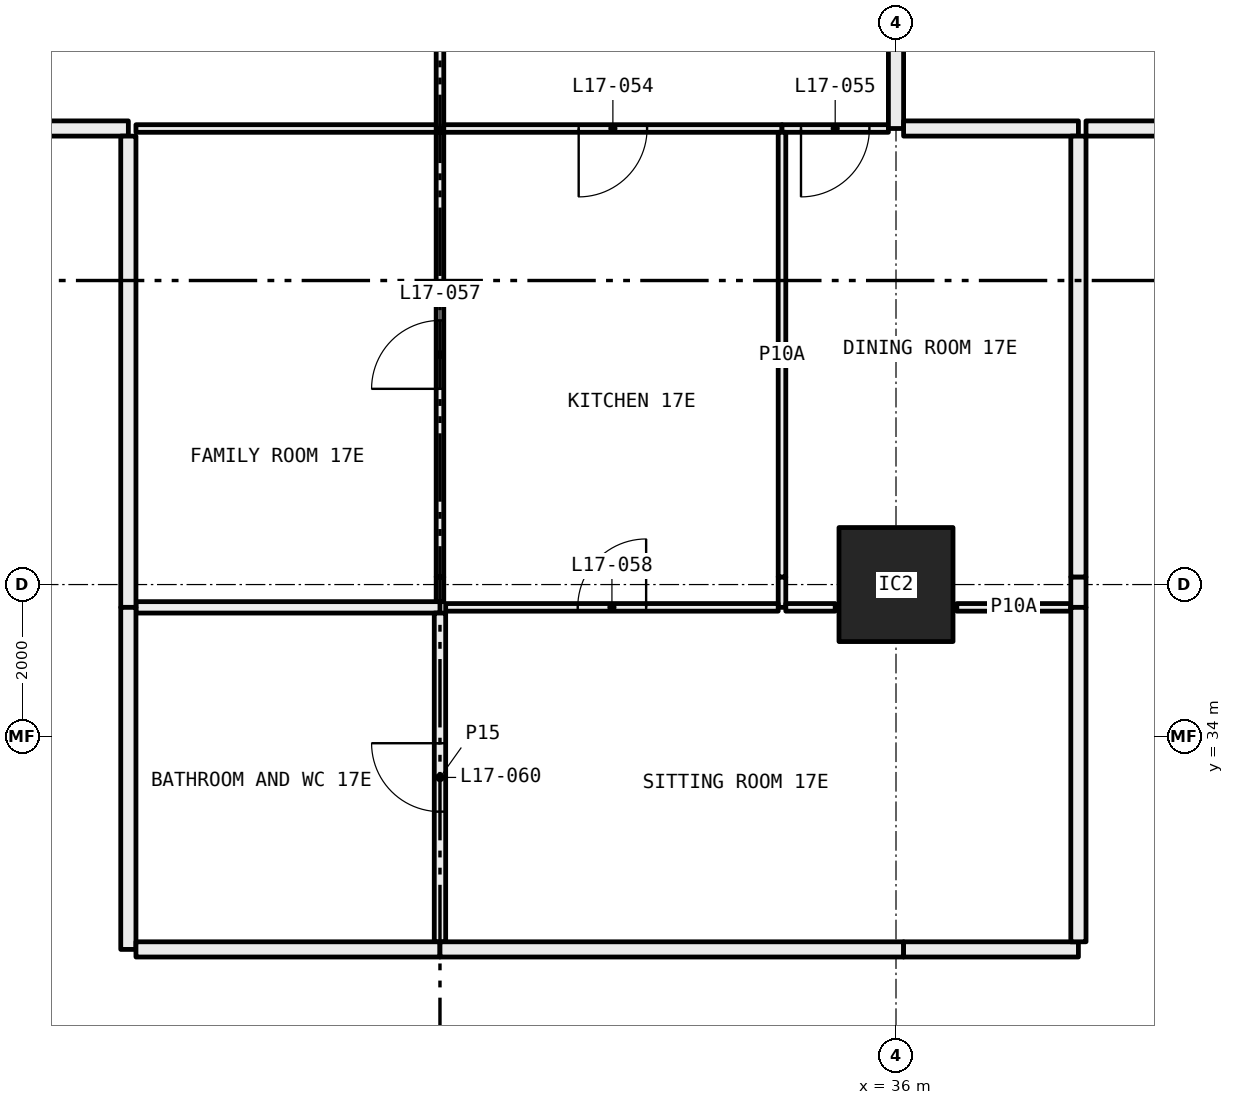
"""IFC4 building model, lengths in metres.
Left out: names, types, materials, properties, quantities, classifications, styles, units other than length and angle.
Written with IfcOpenShell. Run it as: python <this file> out.ifc"""

import sys

from ifc_helpers import new_model, si_unit, direction, frame, frame_2d, origin, origin_2d, place, context, subcontext, project, spatial, rectangle, hollow_rectangle, extrude, element, fill, save


model = new_model("IFC4")
c1 = context("Model", 3, precision=1e-05, world=origin(), true_north=direction((0.0, 1.0)))
c2 = subcontext(c1, "Body", "Model", "MODEL_VIEW")
j1 = project(units=[si_unit("LENGTHUNIT", "METRE"), si_unit("PLANEANGLEUNIT", "RADIAN")], contexts=[c1])
p1 = place(None, origin())
s1 = spatial("IfcSite", under=j1, at=p1, CompositionType="ELEMENT")
p2 = place(p1, origin())
s2 = spatial("IfcBuilding", under=s1, at=p2, CompositionType="ELEMENT")
p3 = place(p2, frame((0.0, 0.0, 71.4)))
s3 = spatial("IfcBuildingStorey", under=s2, at=p3, CompositionType="ELEMENT", Elevation=71.4)
p4 = place(p3, frame((36.0, 36.0, 0.0), z_axis=(0.0, 0.0, 1.0), x_axis=(1.0, 0.0, 0.0)))
e1 = element("IfcColumn", 1, at=p4, inside=s3, PredefinedType="COLUMN", context=c2, shape_type="SweptSolid", body=[
    extrude(hollow_rectangle(XDim=1.5, YDim=1.5, WallThickness=0.065, at=origin_2d()), origin(), (0.0, 0.0, 1.0), 3.05),
])
p5 = place(p3, frame((30.0, 42.0, 0.0), z_axis=(0.0, 0.0, 1.0), x_axis=(0.0, 1.0, 0.0)))
e2 = element("IfcWall", 2, at=p5, inside=s3, PredefinedType="PARTITIONING", context=c2, shape_type="SweptSolid", body=[
    extrude(rectangle(XDim=5.28, YDim=0.1, at=frame_2d((2.64, 0.0))), origin(), (0.0, 0.0, 1.0), 3.05),
])
p6 = place(p5, frame((2.19, 0.0, 0.0)))
e3 = element("IfcOpeningElement", 3, at=p6, cuts=e2, PredefinedType="OPENING", context=c2, shape_type="SweptSolid", body=[
    extrude(rectangle(XDim=0.9, YDim=2.1, at=frame_2d((0.45, 1.05))), frame((0.0, 0.06, 0.0), z_axis=(0.0, -1.0, 0.0), x_axis=(1.0, 0.0, 0.0)), (0.0, 0.0, 1.0), 0.12),
])
p7 = place(p3, frame((26.0, 42.0, 0.0), z_axis=(0.0, 0.0, 1.0), x_axis=(1.0, 0.0, 0.0)))
e4 = element("IfcWall", 4, at=p7, inside=s3, PredefinedType="PARTITIONING", context=c2, shape_type="SweptSolid", body=[
    extrude(rectangle(XDim=3.95, YDim=0.1, at=frame_2d((1.975, 0.0))), origin(), (0.0, 0.0, 1.0), 3.05),
])
p8 = place(p3, frame((24.0, 42.0, 0.0), z_axis=(0.0, 0.0, 1.0), x_axis=(1.0, 0.0, 0.0)))
e5 = element("IfcWall", 5, at=p8, inside=s3, PredefinedType="PARTITIONING", context=c2, shape_type="SweptSolid", body=[
    extrude(rectangle(XDim=1.9, YDim=0.2, at=frame_2d((0.95, 0.0))), origin(), (0.0, 0.0, 1.0), 3.05),
])
p9 = place(p3, frame((30.05, 42.0, 0.0), z_axis=(0.0, 0.0, 1.0), x_axis=(1.0, 0.0, 0.0)))
e6 = element("IfcWall", 6, at=p9, inside=s3, PredefinedType="PARTITIONING", context=c2, shape_type="SweptSolid", body=[
    extrude(rectangle(XDim=4.45, YDim=0.1, at=frame_2d((2.225, 0.0))), origin(), (0.0, 0.0, 1.0), 3.05),
])
p10 = place(p9, frame((1.775, 0.0, 0.0)))
e7 = element("IfcOpeningElement", 7, at=p10, cuts=e6, PredefinedType="OPENING", context=c2, shape_type="SweptSolid", body=[
    extrude(rectangle(XDim=0.9, YDim=2.1, at=frame_2d((0.45, 1.05))), frame((0.0, 0.06, 0.0), z_axis=(0.0, -1.0, 0.0), x_axis=(1.0, 0.0, 0.0)), (0.0, 0.0, 1.0), 0.12),
])
p11 = place(p3, frame((34.5, 42.0, 0.0), z_axis=(0.0, 0.0, 1.0), x_axis=(1.0, 0.0, 0.0)))
e8 = element("IfcWall", 8, at=p11, inside=s3, PredefinedType="PARTITIONING", context=c2, shape_type="SweptSolid", body=[
    extrude(rectangle(XDim=1.4, YDim=0.1, at=frame_2d((0.7, 0.0))), origin(), (0.0, 0.0, 1.0), 3.05),
])
p12 = place(p11, frame((0.25, 0.0, 0.0)))
e9 = element("IfcOpeningElement", 9, at=p12, cuts=e8, PredefinedType="OPENING", context=c2, shape_type="SweptSolid", body=[
    extrude(rectangle(XDim=0.9, YDim=2.1, at=frame_2d((0.45, 1.05))), frame((0.0, 0.06, 0.0), z_axis=(0.0, -1.0, 0.0), x_axis=(1.0, 0.0, 0.0)), (0.0, 0.0, 1.0), 0.12),
])
p13 = place(p3, frame((36.0, 42.0, 0.0), z_axis=(0.0, 0.0, 1.0), x_axis=(0.0, 1.0, 0.0)))
e10 = element("IfcWall", 10, at=p13, inside=s3, PredefinedType="PARTITIONING", context=c2, shape_type="SweptSolid", body=[
    extrude(rectangle(XDim=3.0, YDim=0.2, at=frame_2d((1.5, 0.0))), origin(), (0.0, 0.0, 1.0), 2.45),
])
p14 = place(p3, frame((30.0, 35.775, 0.0), z_axis=(0.0, 0.0, 1.0), x_axis=(0.0, 1.0, 0.0)))
e11 = element("IfcWall", 11, at=p14, inside=s3, PredefinedType="PARTITIONING", context=c2, shape_type="SweptSolid", body=[
    extrude(rectangle(XDim=0.325, YDim=0.1, at=frame_2d((0.163, 0.0))), origin(), (0.0, 0.0, 1.0), 2.45),
])
p15 = place(p3, frame((30.0, 36.1, 0.0), z_axis=(0.0, 0.0, 1.0), x_axis=(0.0, 1.0, 0.0)))
e12 = element("IfcWall", 12, at=p15, inside=s3, PredefinedType="PARTITIONING", context=c2, shape_type="SweptSolid", body=[
    extrude(rectangle(XDim=5.85, YDim=0.1, at=frame_2d((2.925, 0.0))), origin(), (0.0, 0.0, 1.0), 3.05),
])
p16 = place(p15, frame((2.475, 0.0, 0.0)))
e13 = element("IfcOpeningElement", 13, at=p16, cuts=e12, PredefinedType="OPENING", context=c2, shape_type="SweptSolid", body=[
    extrude(rectangle(XDim=0.9, YDim=2.1, at=frame_2d((0.45, 1.05))), frame((0.0, 0.06, 0.0), z_axis=(0.0, -1.0, 0.0), x_axis=(1.0, 0.0, 0.0)), (0.0, 0.0, 1.0), 0.12),
])
p17 = place(p3, frame((26.0, 35.7, 0.0), z_axis=(0.0, 0.0, 1.0), x_axis=(1.0, 0.0, 0.0)))
e14 = element("IfcWall", 14, at=p17, inside=s3, PredefinedType="PARTITIONING", context=c2, shape_type="SweptSolid", body=[
    extrude(rectangle(XDim=4.0, YDim=0.15, at=frame_2d((2.0, 0.0))), origin(), (0.0, 0.0, 1.0), 3.05),
])
p18 = place(p3, frame((25.9, 41.9, 0.0), z_axis=(0.0, 0.0, 1.0), x_axis=(0.0, -1.0, 0.0)))
e15 = element("IfcWall", 15, at=p18, inside=s3, PredefinedType="PARTITIONING", context=c2, shape_type="SweptSolid", body=[
    extrude(rectangle(XDim=6.2, YDim=0.2, at=frame_2d((3.1, 0.0))), origin(), (0.0, 0.0, 1.0), 2.45),
])
p19 = place(p3, frame((34.5, 35.7, 0.0), z_axis=(0.0, 0.0, 1.0), x_axis=(0.0, 1.0, 0.0)))
e16 = element("IfcWall", 16, at=p19, inside=s3, PredefinedType="PARTITIONING", context=c2, shape_type="SweptSolid", body=[
    extrude(rectangle(XDim=0.4, YDim=0.1, at=frame_2d((0.2, 0.0))), origin(), (0.0, 0.0, 1.0), 2.45),
])
p20 = place(p3, frame((34.5, 36.1, 0.0), z_axis=(0.0, 0.0, 1.0), x_axis=(0.0, 1.0, 0.0)))
e17 = element("IfcWall", 17, at=p20, inside=s3, PredefinedType="PARTITIONING", context=c2, shape_type="SweptSolid", body=[
    extrude(rectangle(XDim=5.85, YDim=0.1, at=frame_2d((2.925, 0.0))), origin(), (0.0, 0.0, 1.0), 3.05),
])
p21 = place(p3, frame((30.075, 35.7, 0.0), z_axis=(0.0, 0.0, 1.0), x_axis=(1.0, 0.0, 0.0)))
e18 = element("IfcWall", 18, at=p21, inside=s3, PredefinedType="PARTITIONING", context=c2, shape_type="SweptSolid", body=[
    extrude(rectangle(XDim=4.375, YDim=0.1, at=frame_2d((2.188, 0.0))), origin(), (0.0, 0.0, 1.0), 3.05),
])
p22 = place(p21, frame((1.738, 0.0, 0.0)))
e19 = element("IfcOpeningElement", 19, at=p22, cuts=e18, PredefinedType="OPENING", context=c2, shape_type="SweptSolid", body=[
    extrude(rectangle(XDim=0.9, YDim=2.1, at=frame_2d((0.45, 1.05))), frame((0.0, 0.06, 0.0), z_axis=(0.0, -1.0, 0.0), x_axis=(1.0, 0.0, 0.0)), (0.0, 0.0, 1.0), 0.12),
])
p23 = place(p3, frame((34.55, 35.7, 0.0), z_axis=(0.0, 0.0, 1.0), x_axis=(1.0, 0.0, 0.0)))
e20 = element("IfcWall", 20, at=p23, inside=s3, PredefinedType="PARTITIONING", context=c2, shape_type="SweptSolid", body=[
    extrude(rectangle(XDim=0.65, YDim=0.1, at=frame_2d((0.325, 0.0))), origin(), (0.0, 0.0, 1.0), 3.05),
])
p24 = place(p3, frame((36.8, 35.7, 0.0), z_axis=(0.0, 0.0, 1.0), x_axis=(1.0, 0.0, 0.0)))
e21 = element("IfcWall", 21, at=p24, inside=s3, PredefinedType="PARTITIONING", context=c2, shape_type="SweptSolid", body=[
    extrude(rectangle(XDim=1.5, YDim=0.1, at=frame_2d((0.75, 0.0))), origin(), (0.0, 0.0, 1.0), 3.05),
])
p25 = place(p3, frame((38.4, 42.0, 0.0), z_axis=(0.0, 0.0, 1.0), x_axis=(-1.0, 0.0, 0.0)))
e22 = element("IfcWall", 22, at=p25, inside=s3, PredefinedType="PARTITIONING", context=c2, shape_type="SweptSolid", body=[
    extrude(rectangle(XDim=2.3, YDim=0.2, at=frame_2d((1.15, 0.0))), origin(), (0.0, 0.0, 1.0), 3.05),
])
p26 = place(p3, frame((38.4, 35.7, 0.0), z_axis=(0.0, 0.0, 1.0), x_axis=(0.0, 1.0, 0.0)))
e23 = element("IfcWall", 23, at=p26, inside=s3, PredefinedType="PARTITIONING", context=c2, shape_type="SweptSolid", body=[
    extrude(rectangle(XDim=0.4, YDim=0.2, at=frame_2d((0.2, 0.0))), origin(), (0.0, 0.0, 1.0), 2.45),
])
p27 = place(p3, frame((38.4, 36.1, 0.0), z_axis=(0.0, 0.0, 1.0), x_axis=(0.0, 1.0, 0.0)))
e24 = element("IfcWall", 24, at=p27, inside=s3, PredefinedType="PARTITIONING", context=c2, shape_type="SweptSolid", body=[
    extrude(rectangle(XDim=5.8, YDim=0.2, at=frame_2d((2.9, 0.0))), origin(), (0.0, 0.0, 1.0), 3.05),
])
p28 = place(p3, frame((30.0, 31.3, 0.0), z_axis=(0.0, 0.0, 1.0), x_axis=(0.0, 1.0, 0.0)))
e25 = element("IfcWall", 25, at=p28, inside=s3, PredefinedType="PARTITIONING", context=c2, shape_type="SweptSolid", body=[
    extrude(rectangle(XDim=4.325, YDim=0.15, at=frame_2d((2.163, 0.0))), origin(), (0.0, 0.0, 1.0), 3.05),
])
p29 = place(p28, frame((1.712, 0.0, 0.0)))
e26 = element("IfcOpeningElement", 26, at=p29, cuts=e25, PredefinedType="OPENING", context=c2, shape_type="SweptSolid", body=[
    extrude(rectangle(XDim=0.9, YDim=2.1, at=frame_2d((0.45, 1.05))), frame((0.0, 0.085, 0.0), z_axis=(0.0, -1.0, 0.0), x_axis=(1.0, 0.0, 0.0)), (0.0, 0.0, 1.0), 0.17),
])
p30 = place(p3, frame((25.9, 35.7, 0.0), z_axis=(0.0, 0.0, 1.0), x_axis=(0.0, -1.0, 0.0)))
e27 = element("IfcWall", 27, at=p30, inside=s3, PredefinedType="PARTITIONING", context=c2, shape_type="SweptSolid", body=[
    extrude(rectangle(XDim=4.5, YDim=0.2, at=frame_2d((2.25, 0.0))), origin(), (0.0, 0.0, 1.0), 3.05),
])
p31 = place(p3, frame((26.0, 31.2, 0.0), z_axis=(0.0, 0.0, 1.0), x_axis=(1.0, 0.0, 0.0)))
e28 = element("IfcWall", 28, at=p31, inside=s3, PredefinedType="PARTITIONING", context=c2, shape_type="SweptSolid", body=[
    extrude(rectangle(XDim=4.0, YDim=0.2, at=frame_2d((2.0, 0.0))), origin(), (0.0, 0.0, 1.0), 3.05),
])
p32 = place(p3, frame((30.0, 31.2, 0.0), z_axis=(0.0, 0.0, 1.0), x_axis=(1.0, 0.0, 0.0)))
e29 = element("IfcWall", 29, at=p32, inside=s3, PredefinedType="PARTITIONING", context=c2, shape_type="SweptSolid", body=[
    extrude(rectangle(XDim=6.1, YDim=0.2, at=frame_2d((3.05, 0.0))), origin(), (0.0, 0.0, 1.0), 2.45),
])
p33 = place(p3, frame((36.1, 31.2, 0.0), z_axis=(0.0, 0.0, 1.0), x_axis=(1.0, 0.0, 0.0)))
e30 = element("IfcWall", 30, at=p33, inside=s3, PredefinedType="PARTITIONING", context=c2, shape_type="SweptSolid", body=[
    extrude(rectangle(XDim=2.3, YDim=0.2, at=frame_2d((1.15, 0.0))), origin(), (0.0, 0.0, 1.0), 3.05),
])
p34 = place(p3, frame((38.4, 31.3, 0.0), z_axis=(0.0, 0.0, 1.0), x_axis=(0.0, 1.0, 0.0)))
e31 = element("IfcWall", 31, at=p34, inside=s3, PredefinedType="PARTITIONING", context=c2, shape_type="SweptSolid", body=[
    extrude(rectangle(XDim=4.4, YDim=0.2, at=frame_2d((2.2, 0.0))), origin(), (0.0, 0.0, 1.0), 3.05),
])
p35 = place(p3, frame((38.5, 42.0, 0.0), z_axis=(0.0, 0.0, 1.0), x_axis=(1.0, 0.0, 0.0)))
e32 = element("IfcWall", 32, at=p35, inside=s3, PredefinedType="PARTITIONING", context=c2, shape_type="SweptSolid", body=[
    extrude(rectangle(XDim=2.3, YDim=0.2, at=frame_2d((1.15, 0.0))), origin(), (0.0, 0.0, 1.0), 3.05),
])
p36 = place(p10, frame((0.9, 0.0, 0.0), x_axis=(-1.0, 0.0, 0.0)))
e33 = element("IfcDoor", 33, at=p36, inside=s3, OperationType="SINGLE_SWING_LEFT", PredefinedType="DOOR", context=c2, shape_type="SweptSolid", body=[
    extrude(rectangle(XDim=0.9, YDim=2.1, at=frame_2d((0.45, 1.05))), frame((0.0, 0.025, 0.0), z_axis=(0.0, -1.0, 0.0), x_axis=(1.0, 0.0, 0.0)), (0.0, 0.0, 1.0), 0.05),
])
fill(e7, e33)
p37 = place(p12, frame((0.9, 0.0, 0.0), x_axis=(-1.0, 0.0, 0.0)))
e34 = element("IfcDoor", 34, at=p37, inside=s3, OperationType="SINGLE_SWING_LEFT", PredefinedType="DOOR", context=c2, shape_type="SweptSolid", body=[
    extrude(rectangle(XDim=0.9, YDim=2.1, at=frame_2d((0.45, 1.05))), frame((0.0, 0.025, 0.0), z_axis=(0.0, -1.0, 0.0), x_axis=(1.0, 0.0, 0.0)), (0.0, 0.0, 1.0), 0.05),
])
fill(e9, e34)
p38 = place(p16, origin())
e35 = element("IfcDoor", 35, at=p38, inside=s3, OperationType="SINGLE_SWING_RIGHT", PredefinedType="DOOR", context=c2, shape_type="SweptSolid", body=[
    extrude(rectangle(XDim=0.9, YDim=2.1, at=frame_2d((0.45, 1.05))), frame((0.0, 0.025, 0.0), z_axis=(0.0, -1.0, 0.0), x_axis=(1.0, 0.0, 0.0)), (0.0, 0.0, 1.0), 0.05),
])
fill(e13, e35)
p39 = place(p22, origin())
e36 = element("IfcDoor", 36, at=p39, inside=s3, OperationType="SINGLE_SWING_LEFT", PredefinedType="DOOR", context=c2, shape_type="SweptSolid", body=[
    extrude(rectangle(XDim=0.9, YDim=2.1, at=frame_2d((0.45, 1.05))), frame((0.0, 0.025, 0.0), z_axis=(0.0, -1.0, 0.0), x_axis=(1.0, 0.0, 0.0)), (0.0, 0.0, 1.0), 0.05),
])
fill(e19, e36)
p40 = place(p29, origin())
e37 = element("IfcDoor", 37, at=p40, inside=s3, OperationType="SINGLE_SWING_LEFT", PredefinedType="DOOR", context=c2, shape_type="SweptSolid", body=[
    extrude(rectangle(XDim=0.9, YDim=2.1, at=frame_2d((0.45, 1.05))), frame((0.0, 0.025, 0.0), z_axis=(0.0, -1.0, 0.0), x_axis=(1.0, 0.0, 0.0)), (0.0, 0.0, 1.0), 0.05),
])
fill(e26, e37)
save(model, sys.argv[1])
